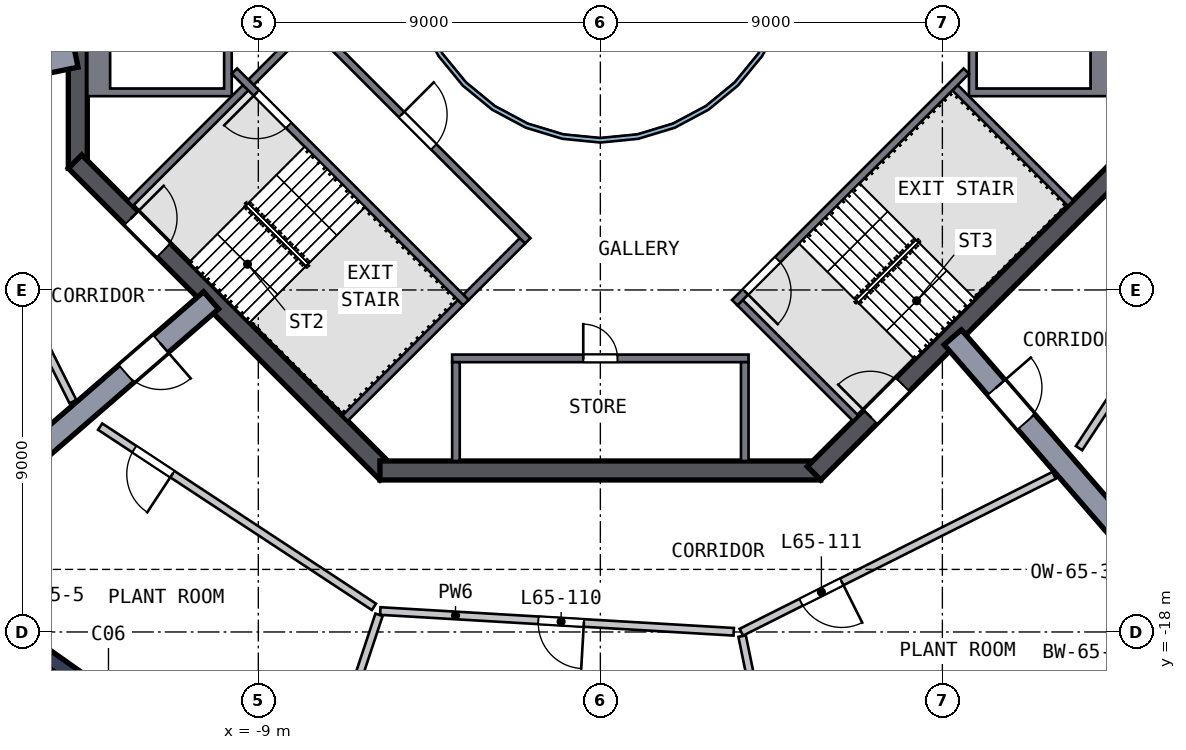
"""IFC4 building model, lengths in metres.
Left out: names, types, materials, properties, quantities, classifications, styles, units other than length and angle.
Written with IfcOpenShell. Run it as: python <this file> out.ifc"""

import sys

from ifc_helpers import new_model, si_unit, direction, frame, frame_2d, origin, place, context, subcontext, project, spatial, polyline, rectangle, outline, extrude, element, fill, save


model = new_model("IFC4")
c1 = context("Model", 3, precision=1e-05, world=origin(), true_north=direction((0.0, 1.0)))
c2 = subcontext(c1, "Body", "Model", "MODEL_VIEW")
j1 = project(units=[si_unit("LENGTHUNIT", "METRE"), si_unit("PLANEANGLEUNIT", "RADIAN")], contexts=[c1])
p1 = place(None, origin())
s1 = spatial("IfcSite", under=j1, at=p1, CompositionType="ELEMENT")
p2 = place(p1, origin())
s2 = spatial("IfcBuilding", under=s1, at=p2, CompositionType="ELEMENT")
p3 = place(p2, frame((0.0, 0.0, 263.0)))
s3 = spatial("IfcBuildingStorey", under=s2, at=p3, CompositionType="ELEMENT", Elevation=263.0)
p4 = place(p3, frame((-13.75, 5.799, 0.0), z_axis=(0.0, 0.0, 1.0), x_axis=(0.0, -1.0, 0.0)))
e1 = element("IfcWall", 1, at=p4, inside=s3, PredefinedType="SHEAR", context=c2, shape_type="SweptSolid", body=[
    extrude(rectangle(XDim=11.598, YDim=0.5, at=frame_2d((5.799, 0.0))), origin(), (0.0, 0.0, 1.0), 6.0),
])
p5 = place(p4, frame((4.899, 0.0, 0.0)))
e2 = element("IfcOpeningElement", 2, at=p5, cuts=e1, PredefinedType="OPENING", context=c2, shape_type="SweptSolid", body=[
    extrude(rectangle(XDim=1.8, YDim=2.1, at=frame_2d((0.9, 1.05))), frame((0.0, 0.26, 0.0), z_axis=(0.0, -1.0, 0.0), x_axis=(1.0, 0.0, 0.0)), (0.0, 0.0, 1.0), 0.52),
])
p6 = place(p3, frame((-13.823, -5.622, 0.0), z_axis=(0.0, 0.0, 1.0), x_axis=(0.707106781, -0.707106781, 0.0)))
e3 = element("IfcWall", 3, at=p6, inside=s3, PredefinedType="SHEAR", context=c2, shape_type="SweptSolid", body=[
    extrude(rectangle(XDim=11.598, YDim=0.5, at=frame_2d((5.799, 0.0))), origin(), (0.0, 0.0, 1.0), 6.0),
])
p7 = place(p6, frame((2.099, 0.0, 0.0)))
e4 = element("IfcOpeningElement", 4, at=p7, cuts=e3, PredefinedType="OPENING", context=c2, shape_type="SweptSolid", body=[
    extrude(rectangle(XDim=1.2, YDim=2.1, at=frame_2d((0.6, 1.05))), frame((0.0, 0.26, 0.0), z_axis=(0.0, -1.0, 0.0), x_axis=(1.0, 0.0, 0.0)), (0.0, 0.0, 1.0), 0.52),
])
p8 = place(p3, frame((-5.799, -13.75, 0.0), z_axis=(0.0, 0.0, 1.0), x_axis=(1.0, 0.0, 0.0)))
e5 = element("IfcWall", 5, at=p8, inside=s3, PredefinedType="SHEAR", context=c2, shape_type="SweptSolid", body=[
    extrude(rectangle(XDim=11.598, YDim=0.5, at=frame_2d((5.799, 0.0))), origin(), (0.0, 0.0, 1.0), 6.0),
])
p9 = place(p3, frame((5.622, -13.823, 0.0), z_axis=(0.0, 0.0, 1.0), x_axis=(0.707106781, 0.707106781, 0.0)))
e6 = element("IfcWall", 6, at=p9, inside=s3, PredefinedType="SHEAR", context=c2, shape_type="SweptSolid", body=[
    extrude(rectangle(XDim=11.598, YDim=0.5, at=frame_2d((5.799, 0.0))), origin(), (0.0, 0.0, 1.0), 6.0),
])
p10 = place(p9, frame((2.099, 0.0, 0.0)))
e7 = element("IfcOpeningElement", 7, at=p10, cuts=e6, PredefinedType="OPENING", context=c2, shape_type="SweptSolid", body=[
    extrude(rectangle(XDim=1.2, YDim=2.1, at=frame_2d((0.6, 1.05))), frame((0.0, 0.26, 0.0), z_axis=(0.0, -1.0, 0.0), x_axis=(1.0, 0.0, 0.0)), (0.0, 0.0, 1.0), 0.52),
])
p11 = place(p3, frame((-17.757, -16.414, 0.0), z_axis=(0.0, 0.0, 1.0), x_axis=(0.817331344, -0.576167922, 0.0)))
e8 = element("IfcWall", 8, at=p11, inside=s3, PredefinedType="SHEAR", context=c2, shape_type="SweptSolid", body=[
    extrude(rectangle(XDim=5.396, YDim=0.4, at=frame_2d((2.698, 0.0))), origin(), (0.0, 0.0, 1.0), 4.5),
])
p12 = place(p3, frame((10.971, -20.95, 0.0), z_axis=(0.0, 0.0, 1.0), x_axis=(0.879122155, 0.476596513, 0.0)))
e9 = element("IfcWall", 9, at=p12, inside=s3, PredefinedType="SHEAR", context=c2, shape_type="SweptSolid", body=[
    extrude(rectangle(XDim=5.396, YDim=0.4, at=frame_2d((2.698, 0.0))), origin(), (0.0, 0.0, 1.0), 4.5),
])
p13 = place(p3, frame((-13.804, -2.844, 0.0), z_axis=(0.0, 0.0, 1.0), x_axis=(-0.979429804, -0.201785179, 0.0)))
e10 = element("IfcWall", 10, at=p13, inside=s3, PredefinedType="SHEAR", context=c2, shape_type="SweptSolid", body=[
    extrude(rectangle(XDim=9.792, YDim=0.6, at=frame_2d((4.896, 0.0))), origin(), (0.0, 0.0, 1.0), 4.5),
])
p14 = place(p13, frame((1.65, 0.0, 0.0)))
e11 = element("IfcOpeningElement", 11, at=p14, cuts=e10, PredefinedType="OPENING", context=c2, shape_type="SweptSolid", body=[
    extrude(rectangle(XDim=1.2, YDim=2.1, at=frame_2d((0.6, 1.05))), frame((0.0, 0.31, 0.0), z_axis=(0.0, -1.0, 0.0), x_axis=(1.0, 0.0, 0.0)), (0.0, 0.0, 1.0), 0.62),
])
p15 = place(p3, frame((-10.243, -9.273, 0.0), z_axis=(0.0, 0.0, 1.0), x_axis=(-0.755466645, -0.65518711, 0.0)))
e12 = element("IfcWall", 12, at=p15, inside=s3, PredefinedType="SHEAR", context=c2, shape_type="SweptSolid", body=[
    extrude(rectangle(XDim=10.07, YDim=0.6, at=frame_2d((5.035, 0.0))), origin(), (0.0, 0.0, 1.0), 4.5),
])
p16 = place(p15, frame((1.75, 0.0, 0.0)))
e13 = element("IfcOpeningElement", 13, at=p16, cuts=e12, PredefinedType="OPENING", context=c2, shape_type="SweptSolid", body=[
    extrude(rectangle(XDim=1.2, YDim=2.1, at=frame_2d((0.6, 1.05))), frame((0.0, 0.31, 0.0), z_axis=(0.0, -1.0, 0.0), x_axis=(1.0, 0.0, 0.0)), (0.0, 0.0, 1.0), 0.62),
])
p17 = place(p3, frame((9.273, -10.243, 0.0), z_axis=(0.0, 0.0, 1.0), x_axis=(0.65518711, -0.755466645, 0.0)))
e14 = element("IfcWall", 14, at=p17, inside=s3, PredefinedType="SHEAR", context=c2, shape_type="SweptSolid", body=[
    extrude(rectangle(XDim=10.07, YDim=0.6, at=frame_2d((5.035, 0.0))), origin(), (0.0, 0.0, 1.0), 4.5),
])
p18 = place(p17, frame((1.75, 0.0, 0.0)))
e15 = element("IfcOpeningElement", 15, at=p18, cuts=e14, PredefinedType="OPENING", context=c2, shape_type="SweptSolid", body=[
    extrude(rectangle(XDim=1.2, YDim=2.1, at=frame_2d((0.6, 1.05))), frame((0.0, 0.31, 0.0), z_axis=(0.0, -1.0, 0.0), x_axis=(1.0, 0.0, 0.0)), (0.0, 0.0, 1.0), 0.62),
])
p19 = place(p3, frame((-18.727, -16.624, 0.0), z_axis=(0.0, 0.0, 1.0), x_axis=(0.835230898, -0.549899397, 0.0)))
e16 = element("IfcWall", 16, at=p19, inside=s3, PredefinedType="SOLIDWALL", context=c2, shape_type="SweptSolid", body=[
    extrude(rectangle(XDim=13.075, YDim=0.15, at=frame_2d((6.538, 0.0))), origin(), (0.0, 0.0, 1.0), 4.5),
])
p20 = place(p3, frame((5.023, -24.536, 0.0), z_axis=(0.0, 0.0, 1.0), x_axis=(0.893850085, 0.448365951, 0.0)))
e17 = element("IfcWall", 17, at=p20, inside=s3, PredefinedType="SOLIDWALL", context=c2, shape_type="SweptSolid", body=[
    extrude(rectangle(XDim=13.046, YDim=0.15, at=frame_2d((6.523, 0.0))), origin(), (0.0, 0.0, 1.0), 4.5),
])
p21 = place(p3, origin())
e18 = element("IfcWall", 18, at=p21, inside=s3, PredefinedType="SOLIDWALL", context=c2, shape_type="SweptSolid", body=[
    extrude(outline(polyline([(13.5, -1.2), (13.5, -3.9), (9.7, -3.9), (9.7, -1.2), (13.5, -1.2)]), holes=[polyline([(9.9, -3.7), (12.9, -3.7), (12.9, -1.4), (9.9, -1.4), (9.9, -3.7)])]), origin(), (0.0, 0.0, 1.0), 5.55),
])
p22 = place(p3, origin())
e19 = element("IfcWall", 19, at=p22, inside=s3, PredefinedType="SOLIDWALL", context=c2, shape_type="SweptSolid", body=[
    extrude(outline(polyline([(-9.7, -3.9), (-13.5, -3.9), (-13.5, -1.2), (-9.7, -1.2), (-9.7, -3.9)]), holes=[polyline([(-12.9, -1.4), (-12.9, -3.7), (-9.9, -3.7), (-9.9, -1.4), (-12.9, -1.4)])]), origin(), (0.0, 0.0, 1.0), 5.55),
])
p23 = place(p3, frame((-3.9, -10.8, 0.0), z_axis=(0.0, 0.0, 1.0), x_axis=(1.0, 0.0, 0.0)))
e20 = element("IfcWall", 20, at=p23, inside=s3, PredefinedType="SOLIDWALL", context=c2, shape_type="SweptSolid", body=[
    extrude(rectangle(XDim=7.8, YDim=0.2, at=frame_2d((3.9, 0.0))), origin(), (0.0, 0.0, 1.0), 5.55),
])
p24 = place(p23, frame((3.45, 0.0, 0.0)))
e21 = element("IfcOpeningElement", 21, at=p24, cuts=e20, PredefinedType="OPENING", context=c2, shape_type="SweptSolid", body=[
    extrude(rectangle(XDim=0.9, YDim=2.1, at=frame_2d((0.45, 1.05))), frame((0.0, 0.11, 0.0), z_axis=(0.0, -1.0, 0.0), x_axis=(1.0, 0.0, 0.0)), (0.0, 0.0, 1.0), 0.22),
])
for number, where, z_axis, x_axis in (
    (22, (-3.8, -10.9, 0.0), (0.0, 0.0, 1.0), (0.0, -1.0, 0.0)),
    (23, (3.8, -10.9, 0.0), (0.0, 0.0, 1.0), (0.0, -1.0, 0.0)),
):
    element("IfcWall", number, at=place(p3, frame(where, z_axis=z_axis, x_axis=x_axis)), inside=s3, PredefinedType="SOLIDWALL", context=c2, shape_type="SweptSolid", body=[
        extrude(rectangle(XDim=2.6, YDim=0.2, at=frame_2d((1.3, 0.0))), origin(), (0.0, 0.0, 1.0), 5.55),
    ])
p25 = place(p3, frame((-3.535, -9.334, 0.0), z_axis=(0.0, 0.0, 1.0), x_axis=(-0.707120946, 0.707092617, 0.0)))
e24 = element("IfcWall", 24, at=p25, inside=s3, PredefinedType="SOLIDWALL", context=c2, shape_type="SweptSolid", body=[
    extrude(rectangle(XDim=8.618, YDim=0.2, at=frame_2d((4.309, 0.0))), origin(), (0.0, 0.0, 1.0), 5.55),
])
p26 = place(p25, frame((6.6, 0.0, 0.0)))
e25 = element("IfcOpeningElement", 25, at=p26, cuts=e24, PredefinedType="OPENING", context=c2, shape_type="SweptSolid", body=[
    extrude(rectangle(XDim=1.2, YDim=2.1, at=frame_2d((0.6, 1.05))), frame((0.0, 0.11, 0.0), z_axis=(0.0, -1.0, 0.0), x_axis=(1.0, 0.0, 0.0)), (0.0, 0.0, 1.0), 0.22),
])
for number, where, z_axis, x_axis in (
    (26, (-9.334, -3.677, 0.0), (0.0, 0.0, 1.0), (-0.707, -0.707, 0.0)),
    (27, (-3.677, -9.334, 0.0), (0.0, 0.0, 1.0), (-0.707, -0.707, 0.0)),
):
    element("IfcWall", number, at=place(p3, frame(where, z_axis=z_axis, x_axis=x_axis)), inside=s3, PredefinedType="SOLIDWALL", context=c2, shape_type="SweptSolid", body=[
        extrude(rectangle(XDim=4.3, YDim=0.2, at=frame_2d((2.15, 0.0))), origin(), (0.0, 0.0, 1.0), 5.55),
    ])
p27 = place(p3, frame((9.629, -3.24, 0.0), z_axis=(0.0, 0.0, 1.0), x_axis=(-0.707120946, -0.707092617, 0.0)))
e28 = element("IfcWall", 28, at=p27, inside=s3, PredefinedType="SOLIDWALL", context=c2, shape_type="SweptSolid", body=[
    extrude(rectangle(XDim=8.618, YDim=0.2, at=frame_2d((4.309, 0.0))), origin(), (0.0, 0.0, 1.0), 5.55),
])
p28 = place(p27, frame((7.018, 0.0, 0.0)))
e29 = element("IfcOpeningElement", 29, at=p28, cuts=e28, PredefinedType="OPENING", context=c2, shape_type="SweptSolid", body=[
    extrude(rectangle(XDim=1.2, YDim=2.1, at=frame_2d((0.6, 1.05))), frame((0.0, 0.11, 0.0), z_axis=(0.0, -1.0, 0.0), x_axis=(1.0, 0.0, 0.0)), (0.0, 0.0, 1.0), 0.22),
])
for number, where, z_axis, x_axis in (
    (30, (3.677, -9.334, 0.0), (0.0, 0.0, 1.0), (0.707, -0.707, 0.0)),
    (31, (9.334, -3.677, 0.0), (0.0, 0.0, 1.0), (0.707, -0.707, 0.0)),
):
    element("IfcWall", number, at=place(p3, frame(where, z_axis=z_axis, x_axis=x_axis)), inside=s3, PredefinedType="SOLIDWALL", context=c2, shape_type="SweptSolid", body=[
        extrude(rectangle(XDim=4.3, YDim=0.2, at=frame_2d((2.15, 0.0))), origin(), (0.0, 0.0, 1.0), 5.55),
    ])
p29 = place(p3, frame((-7.708, -1.909, 0.0), z_axis=(0.0, 0.0, 1.0), x_axis=(0.707106781, -0.707106781, 0.0)))
e32 = element("IfcWall", 32, at=p29, inside=s3, PredefinedType="SOLIDWALL", context=c2, shape_type="SweptSolid", body=[
    extrude(rectangle(XDim=8.2, YDim=0.2, at=frame_2d((4.1, 0.0))), origin(), (0.0, 0.0, 1.0), 5.55),
])
p30 = place(p29, frame((3.5, 0.0, 0.0)))
e33 = element("IfcOpeningElement", 33, at=p30, cuts=e32, PredefinedType="OPENING", context=c2, shape_type="SweptSolid", body=[
    extrude(rectangle(XDim=1.2, YDim=2.1, at=frame_2d((0.6, 1.05))), frame((0.0, 0.11, 0.0), z_axis=(0.0, -1.0, 0.0), x_axis=(1.0, 0.0, 0.0)), (0.0, 0.0, 1.0), 0.22),
])
for number, where, z_axis, x_axis in (
    (34, (-7.708, -2.051, 0.0), (0.0, 0.0, 1.0), (-0.707, -0.707, 0.0)),
    (35, (-2.051, -7.708, 0.0), (0.0, 0.0, 1.0), (-0.707, -0.707, 0.0)),
):
    element("IfcWall", number, at=place(p3, frame(where, z_axis=z_axis, x_axis=x_axis)), inside=s3, PredefinedType="SOLIDWALL", context=c2, shape_type="SweptSolid", body=[
        extrude(rectangle(XDim=2.1, YDim=0.2, at=frame_2d((1.05, 0.0))), origin(), (0.0, 0.0, 1.0), 5.55),
    ])
p31 = place(p3, origin())
e36 = element("IfcWall", 36, at=p31, inside=s3, PredefinedType="SOLIDWALL", context=c2, shape_type="SweptSolid", body=[
    extrude(outline(polyline([(5.021, -0.999), (4.73, -1.959), (4.257, -2.844), (3.62, -3.62), (2.844, -4.257), (1.959, -4.73), (0.999, -5.021), (0.0, -5.12), (-0.999, -5.021), (-1.959, -4.73), (-2.844, -4.257), (-3.62, -3.62), (-4.257, -2.844), (-4.73, -1.959), (-5.021, -0.999), (-5.12, 0.0), (-5.021, 0.999), (-4.73, 1.959), (-4.257, 2.844), (-3.62, 3.62), (-2.844, 4.257), (-1.959, 4.73), (-0.999, 5.021), (0.0, 5.12), (0.999, 5.021), (1.959, 4.73), (2.844, 4.257), (3.62, 3.62), (4.257, 2.844), (4.73, 1.959), (5.021, 0.999), (5.12, 0.0), (5.021, -0.999)]), holes=[polyline([(4.904, 0.976), (4.619, 1.913), (4.157, 2.778), (3.535, 3.535), (2.778, 4.157), (1.913, 4.619), (0.976, 4.904), (0.0, 5.0), (-0.976, 4.904), (-1.913, 4.619), (-2.778, 4.157), (-3.535, 3.535), (-4.157, 2.778), (-4.619, 1.913), (-4.904, 0.976), (-5.0, 0.0), (-4.904, -0.976), (-4.619, -1.913), (-4.157, -2.778), (-3.535, -3.535), (-2.778, -4.157), (-1.913, -4.619), (-0.976, -4.904), (0.0, -5.0), (0.976, -4.904), (1.913, -4.619), (2.778, -4.157), (3.535, -3.535), (4.157, -2.778), (4.619, -1.913), (4.904, -0.976), (5.0, 0.0), (4.904, 0.976)])]), origin(), (0.0, 0.0, 1.0), 5.55),
])
p32 = place(p3, frame((-15.783, -8.141, 0.0), z_axis=(0.0, 0.0, 1.0), x_axis=(0.448385612, -0.893840223, 0.0)))
e37 = element("IfcWall", 37, at=p32, inside=s3, PredefinedType="SOLIDWALL", context=c2, shape_type="SweptSolid", body=[
    extrude(rectangle(XDim=4.248, YDim=0.2, at=frame_2d((2.124, 0.0))), origin(), (0.0, 0.0, 1.0), 4.5),
])
p33 = place(p3, frame((-5.958, -17.339, 0.0), z_axis=(0.0, 0.0, 1.0), x_axis=(-0.835241577, 0.549883176, 0.0)))
e38 = element("IfcWall", 38, at=p33, inside=s3, PredefinedType="SOLIDWALL", context=c2, shape_type="SweptSolid", body=[
    extrude(rectangle(XDim=8.625, YDim=0.2, at=frame_2d((4.312, 0.0))), origin(), (0.0, 0.0, 1.0), 4.5),
])
p34 = place(p33, frame((6.35, 0.0, 0.0)))
e39 = element("IfcOpeningElement", 39, at=p34, cuts=e38, PredefinedType="OPENING", context=c2, shape_type="SweptSolid", body=[
    extrude(rectangle(XDim=1.2, YDim=2.1, at=frame_2d((0.6, 1.05))), frame((0.0, 0.11, 0.0), z_axis=(0.0, -1.0, 0.0), x_axis=(1.0, 0.0, 0.0)), (0.0, 0.0, 1.0), 0.22),
])
p35 = place(p3, frame((-5.823, -17.547, 0.0), z_axis=(0.0, 0.0, 1.0), x_axis=(-0.315012313, -0.949087584, 0.0)))
e40 = element("IfcWall", 40, at=p35, inside=s3, PredefinedType="SOLIDWALL", context=c2, shape_type="SweptSolid", body=[
    extrude(rectangle(XDim=5.726, YDim=0.2, at=frame_2d((2.863, 0.0))), origin(), (0.0, 0.0, 1.0), 4.5),
])
p36 = place(p3, frame((3.51, -17.995, 0.0), z_axis=(0.0, 0.0, 1.0), x_axis=(-0.998280332, 0.058620635, 0.0)))
e41 = element("IfcWall", 41, at=p36, inside=s3, PredefinedType="SOLIDWALL", context=c2, shape_type="SweptSolid", body=[
    extrude(rectangle(XDim=9.317, YDim=0.2, at=frame_2d((4.658, 0.0))), origin(), (0.0, 0.0, 1.0), 4.5),
])
p37 = place(p36, frame((3.95, 0.0, 0.0)))
e42 = element("IfcOpeningElement", 42, at=p37, cuts=e41, PredefinedType="OPENING", context=c2, shape_type="SweptSolid", body=[
    extrude(rectangle(XDim=1.2, YDim=2.1, at=frame_2d((0.6, 1.05))), frame((0.0, 0.11, 0.0), z_axis=(0.0, -1.0, 0.0), x_axis=(1.0, 0.0, 0.0)), (0.0, 0.0, 1.0), 0.22),
])
p38 = place(p3, frame((3.73, -18.108, 0.0), z_axis=(0.0, 0.0, 1.0), x_axis=(0.201771526, -0.979432617, 0.0)))
e43 = element("IfcWall", 43, at=p38, inside=s3, PredefinedType="SOLIDWALL", context=c2, shape_type="SweptSolid", body=[
    extrude(rectangle(XDim=5.576, YDim=0.2, at=frame_2d((2.788, 0.0))), origin(), (0.0, 0.0, 1.0), 4.5),
])
p39 = place(p3, frame((11.939, -13.878, 0.0), z_axis=(0.0, 0.0, 1.0), x_axis=(-0.893843051, -0.448379973, 0.0)))
e44 = element("IfcWall", 44, at=p39, inside=s3, PredefinedType="SOLIDWALL", context=c2, shape_type="SweptSolid", body=[
    extrude(rectangle(XDim=9.207, YDim=0.2, at=frame_2d((4.604, 0.0))), origin(), (0.0, 0.0, 1.0), 4.5),
])
p40 = place(p39, frame((6.25, 0.0, 0.0)))
e45 = element("IfcOpeningElement", 45, at=p40, cuts=e44, PredefinedType="OPENING", context=c2, shape_type="SweptSolid", body=[
    extrude(rectangle(XDim=1.2, YDim=2.1, at=frame_2d((0.6, 1.05))), frame((0.0, 0.11, 0.0), z_axis=(0.0, -1.0, 0.0), x_axis=(1.0, 0.0, 0.0)), (0.0, 0.0, 1.0), 0.22),
])
p41 = place(p3, frame((17.107, -6.31, 0.0), z_axis=(0.0, 0.0, 1.0), x_axis=(-0.549883224, -0.835241546, 0.0)))
e46 = element("IfcWall", 46, at=p41, inside=s3, PredefinedType="SOLIDWALL", context=c2, shape_type="SweptSolid", body=[
    extrude(rectangle(XDim=8.203, YDim=0.2, at=frame_2d((4.102, 0.0))), origin(), (0.0, 0.0, 1.0), 4.5),
])
p42 = place(p41, frame((0.2, 0.0, 0.0)))
e47 = element("IfcOpeningElement", 47, at=p42, cuts=e46, PredefinedType="OPENING", context=c2, shape_type="SweptSolid", body=[
    extrude(rectangle(XDim=1.2, YDim=2.1, at=frame_2d((0.6, 1.05))), frame((0.0, 0.11, 0.0), z_axis=(0.0, -1.0, 0.0), x_axis=(1.0, 0.0, 0.0)), (0.0, 0.0, 1.0), 0.22),
])
p43 = place(p24, origin())
e48 = element("IfcDoor", 48, at=p43, inside=s3, OperationType="SINGLE_SWING_LEFT", PredefinedType="DOOR", context=c2, shape_type="SweptSolid", body=[
    extrude(rectangle(XDim=0.9, YDim=2.1, at=frame_2d((0.45, 1.05))), frame((0.0, 0.025, 0.0), z_axis=(0.0, -1.0, 0.0), x_axis=(1.0, 0.0, 0.0)), (0.0, 0.0, 1.0), 0.05),
])
fill(e21, e48)
p44 = place(p26, origin())
e49 = element("IfcDoor", 49, at=p44, inside=s3, OperationType="SINGLE_SWING_RIGHT", PredefinedType="DOOR", context=c2, shape_type="SweptSolid", body=[
    extrude(rectangle(XDim=1.2, YDim=2.1, at=frame_2d((0.6, 1.05))), frame((0.0, 0.025, 0.0), z_axis=(0.0, -1.0, 0.0), x_axis=(1.0, 0.0, 0.0)), (0.0, 0.0, 1.0), 0.05),
])
fill(e25, e49)
p45 = place(p28, origin())
e50 = element("IfcDoor", 50, at=p45, inside=s3, OperationType="SINGLE_SWING_RIGHT", PredefinedType="DOOR", context=c2, shape_type="SweptSolid", body=[
    extrude(rectangle(XDim=1.2, YDim=2.1, at=frame_2d((0.6, 1.05))), frame((0.0, 0.025, 0.0), z_axis=(0.0, -1.0, 0.0), x_axis=(1.0, 0.0, 0.0)), (0.0, 0.0, 1.0), 0.05),
])
fill(e29, e50)
p46 = place(p7, origin())
e51 = element("IfcDoor", 51, at=p46, inside=s3, OperationType="SINGLE_SWING_LEFT", PredefinedType="DOOR", context=c2, shape_type="SweptSolid", body=[
    extrude(rectangle(XDim=1.2, YDim=2.1, at=frame_2d((0.6, 1.05))), frame((0.0, 0.025, 0.0), z_axis=(0.0, -1.0, 0.0), x_axis=(1.0, 0.0, 0.0)), (0.0, 0.0, 1.0), 0.05),
])
fill(e4, e51)
p47 = place(p10, origin())
e52 = element("IfcDoor", 52, at=p47, inside=s3, OperationType="SINGLE_SWING_LEFT", PredefinedType="DOOR", context=c2, shape_type="SweptSolid", body=[
    extrude(rectangle(XDim=1.2, YDim=2.1, at=frame_2d((0.6, 1.05))), frame((0.0, 0.025, 0.0), z_axis=(0.0, -1.0, 0.0), x_axis=(1.0, 0.0, 0.0)), (0.0, 0.0, 1.0), 0.05),
])
fill(e7, e52)
p48 = place(p30, origin())
e53 = element("IfcDoor", 53, at=p48, inside=s3, OperationType="SINGLE_SWING_LEFT", PredefinedType="DOOR", context=c2, shape_type="SweptSolid", body=[
    extrude(rectangle(XDim=1.2, YDim=2.1, at=frame_2d((0.6, 1.05))), frame((0.0, 0.025, 0.0), z_axis=(0.0, -1.0, 0.0), x_axis=(1.0, 0.0, 0.0)), (0.0, 0.0, 1.0), 0.05),
])
fill(e33, e53)
p49 = place(p16, origin())
e54 = element("IfcDoor", 54, at=p49, inside=s3, OperationType="SINGLE_SWING_LEFT", PredefinedType="DOOR", context=c2, shape_type="SweptSolid", body=[
    extrude(rectangle(XDim=1.2, YDim=2.1, at=frame_2d((0.6, 1.05))), frame((0.0, 0.025, 0.0), z_axis=(0.0, -1.0, 0.0), x_axis=(1.0, 0.0, 0.0)), (0.0, 0.0, 1.0), 0.05),
])
fill(e13, e54)
p50 = place(p18, origin())
e55 = element("IfcDoor", 55, at=p50, inside=s3, OperationType="SINGLE_SWING_LEFT", PredefinedType="DOOR", context=c2, shape_type="SweptSolid", body=[
    extrude(rectangle(XDim=1.2, YDim=2.1, at=frame_2d((0.6, 1.05))), frame((0.0, 0.025, 0.0), z_axis=(0.0, -1.0, 0.0), x_axis=(1.0, 0.0, 0.0)), (0.0, 0.0, 1.0), 0.05),
])
fill(e15, e55)
p51 = place(p34, origin())
e56 = element("IfcDoor", 56, at=p51, inside=s3, OperationType="SINGLE_SWING_LEFT", PredefinedType="DOOR", context=c2, shape_type="SweptSolid", body=[
    extrude(rectangle(XDim=1.2, YDim=2.1, at=frame_2d((0.6, 1.05))), frame((0.0, 0.025, 0.0), z_axis=(0.0, -1.0, 0.0), x_axis=(1.0, 0.0, 0.0)), (0.0, 0.0, 1.0), 0.05),
])
fill(e39, e56)
p52 = place(p37, origin())
e57 = element("IfcDoor", 57, at=p52, inside=s3, OperationType="SINGLE_SWING_LEFT", PredefinedType="DOOR", context=c2, shape_type="SweptSolid", body=[
    extrude(rectangle(XDim=1.2, YDim=2.1, at=frame_2d((0.6, 1.05))), frame((0.0, 0.025, 0.0), z_axis=(0.0, -1.0, 0.0), x_axis=(1.0, 0.0, 0.0)), (0.0, 0.0, 1.0), 0.05),
])
fill(e42, e57)
p53 = place(p40, origin())
e58 = element("IfcDoor", 58, at=p53, inside=s3, OperationType="SINGLE_SWING_LEFT", PredefinedType="DOOR", context=c2, shape_type="SweptSolid", body=[
    extrude(rectangle(XDim=1.2, YDim=2.1, at=frame_2d((0.6, 1.05))), frame((0.0, 0.025, 0.0), z_axis=(0.0, -1.0, 0.0), x_axis=(1.0, 0.0, 0.0)), (0.0, 0.0, 1.0), 0.05),
])
fill(e45, e58)
save(model, sys.argv[1])
